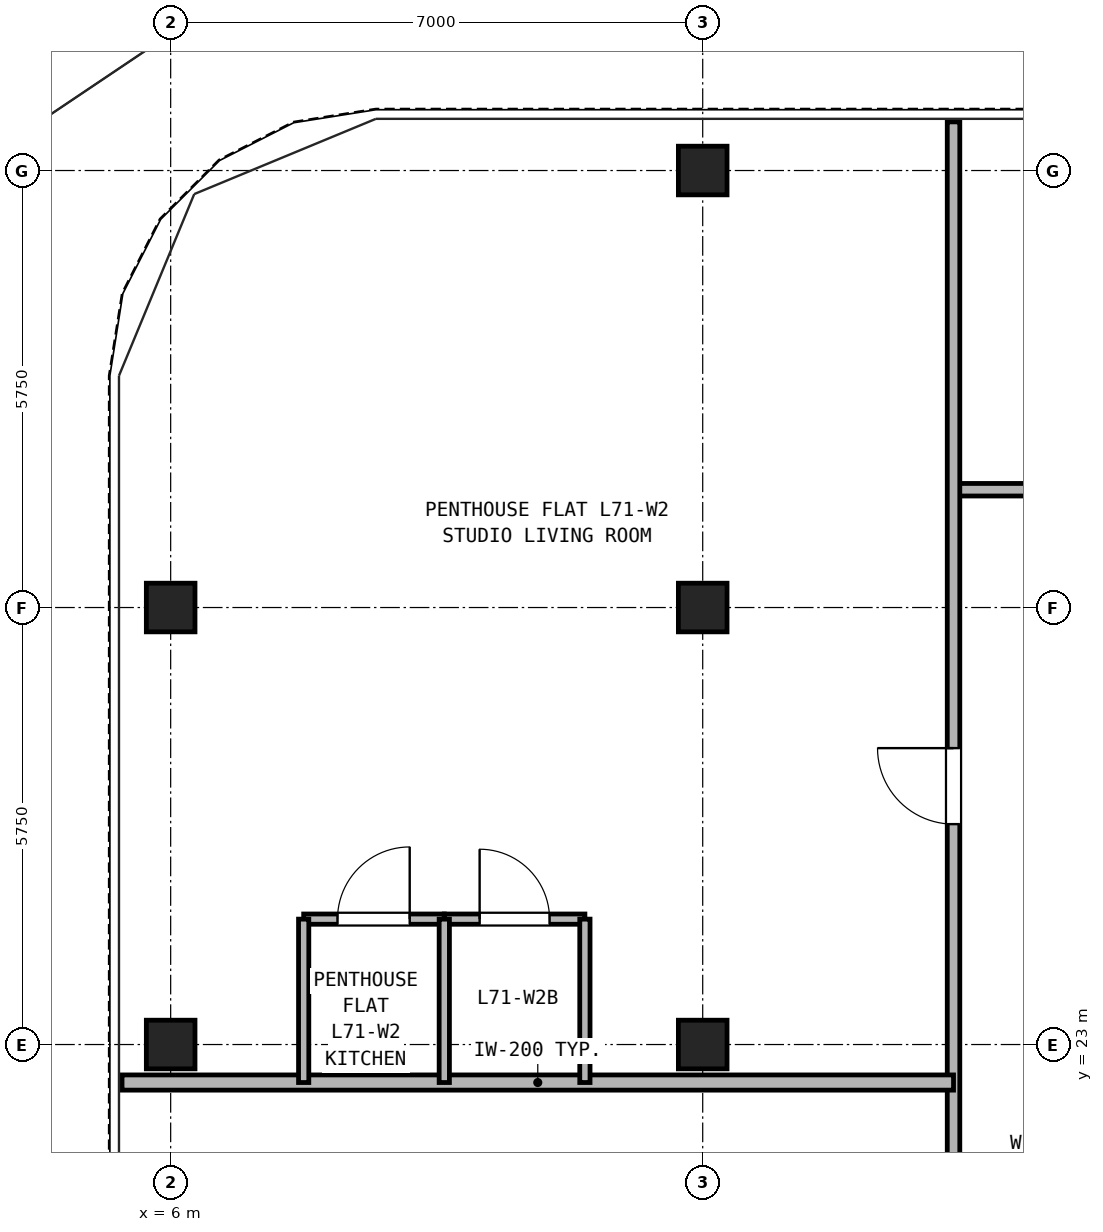
"""IFC4 building model, lengths in metres.
Left out: names, types, materials, properties, quantities, classifications, styles, units other than length and angle.
Written with IfcOpenShell. Run it as: python <this file> out.ifc"""

import sys

from ifc_helpers import new_model, si_unit, direction, frame, frame_2d, origin, origin_2d, place, context, subcontext, project, spatial, rectangle, hollow_rectangle, extrude, source, transform, mapped, element, fill, save


model = new_model("IFC4")
c1 = context("Model", 3, precision=1e-05, world=origin(), true_north=direction((0.0, 1.0)))
c2 = subcontext(c1, "Body", "Model", "MODEL_VIEW")
j1 = project(units=[si_unit("LENGTHUNIT", "METRE"), si_unit("PLANEANGLEUNIT", "RADIAN")], contexts=[c1])
p1 = place(None, origin())
s1 = spatial("IfcSite", under=j1, at=p1, CompositionType="ELEMENT")
p2 = place(p1, origin())
s2 = spatial("IfcBuilding", under=s1, at=p2, CompositionType="ELEMENT")
p3 = place(p2, frame((0.0, 0.0, 248.9)))
s3 = spatial("IfcBuildingStorey", under=s2, at=p3, CompositionType="ELEMENT", Elevation=248.9)
m1 = source(origin(), c2, "Body", "SweptSolid", [
    extrude(hollow_rectangle(XDim=0.64, YDim=0.64, WallThickness=0.035, at=origin_2d()), origin(), (0.0, 0.0, 1.0), 2.98),
])
for number, where, z_axis, x_axis in (
    (1, (13.0, 34.5, 0.0), (0.0, 0.0, 1.0), (1.0, 0.0, 0.0)),
    (2, (6.0, 23.0, 0.0), (0.0, 0.0, 1.0), (1.0, 0.0, 0.0)),
    (3, (6.0, 28.75, 0.0), (0.0, 0.0, 1.0), (1.0, 0.0, 0.0)),
    (4, (13.0, 23.0, 0.0), (0.0, 0.0, 1.0), (1.0, 0.0, 0.0)),
    (5, (13.0, 28.75, 0.0), (0.0, 0.0, 1.0), (1.0, 0.0, 0.0)),
):
    element("IfcColumn", number, at=place(p3, frame(where, z_axis=z_axis, x_axis=x_axis)), inside=s3, PredefinedType="COLUMN", context=c2, shape_type="MappedRepresentation", body=[
        mapped(m1, transform((0.0, 0.0, 0.0), x_axis=(1.0, 0.0, 0.0), y_axis=(0.0, 1.0, 0.0), z_axis=(0.0, 0.0, 1.0), scale=1.0)),
    ])
p4 = place(p3, frame((16.3, 30.3, 0.0), z_axis=(0.0, 0.0, 1.0), x_axis=(1.0, 0.0, 0.0)))
e6 = element("IfcWall", 6, at=p4, inside=s3, PredefinedType="PARTITIONING", context=c2, shape_type="SweptSolid", body=[
    extrude(rectangle(XDim=14.4, YDim=0.165, at=frame_2d((7.2, 0.0))), origin(), (0.0, 0.0, 1.0), 2.98),
])
p5 = place(p4, frame((3.1, 0.0, 0.0)))
e7 = element("IfcOpeningElement", 7, at=p5, cuts=e6, PredefinedType="OPENING", context=c2, shape_type="SweptSolid", body=[
    extrude(rectangle(XDim=0.95, YDim=2.15, at=frame_2d((0.475, 1.075))), frame((0.0, 0.093, 0.0), z_axis=(0.0, -1.0, 0.0), x_axis=(1.0, 0.0, 0.0)), (0.0, 0.0, 1.0), 0.185),
])
p6 = place(p4, frame((8.0, 0.0, 0.0)))
e8 = element("IfcOpeningElement", 8, at=p6, cuts=e6, PredefinedType="OPENING", context=c2, shape_type="SweptSolid", body=[
    extrude(rectangle(XDim=0.95, YDim=2.15, at=frame_2d((0.475, 1.075))), frame((0.0, 0.093, 0.0), z_axis=(0.0, -1.0, 0.0), x_axis=(1.0, 0.0, 0.0)), (0.0, 0.0, 1.0), 0.185),
])
p7 = place(p4, frame((10.8, 0.0, 0.0)))
e9 = element("IfcOpeningElement", 9, at=p7, cuts=e6, PredefinedType="OPENING", context=c2, shape_type="SweptSolid", body=[
    extrude(rectangle(XDim=0.92, YDim=2.1, at=frame_2d((0.46, 1.05))), frame((0.0, 0.093, 0.0), z_axis=(0.0, -1.0, 0.0), x_axis=(1.0, 0.0, 0.0)), (0.0, 0.0, 1.0), 0.185),
])
p8 = place(p3, frame((16.3, 11.2, 0.0), z_axis=(0.0, 0.0, 1.0), x_axis=(0.0, 1.0, 0.0)))
e10 = element("IfcWall", 10, at=p8, inside=s3, PredefinedType="PARTITIONING", context=c2, shape_type="SweptSolid", body=[
    extrude(rectangle(XDim=23.94, YDim=0.165, at=frame_2d((11.97, 0.0))), origin(), (0.0, 0.0, 1.0), 2.98),
])
p9 = place(p8, frame((5.15, 0.0, 0.0)))
e11 = element("IfcOpeningElement", 11, at=p9, cuts=e10, PredefinedType="OPENING", context=c2, shape_type="SweptSolid", body=[
    extrude(rectangle(XDim=1.0, YDim=2.15, at=frame_2d((0.5, 1.075))), frame((0.0, 0.093, 0.0), z_axis=(0.0, -1.0, 0.0), x_axis=(1.0, 0.0, 0.0)), (0.0, 0.0, 1.0), 0.185),
])
p10 = place(p8, frame((14.7, 0.0, 0.0)))
e12 = element("IfcOpeningElement", 12, at=p10, cuts=e10, PredefinedType="OPENING", context=c2, shape_type="SweptSolid", body=[
    extrude(rectangle(XDim=1.0, YDim=2.15, at=frame_2d((0.5, 1.075))), frame((0.0, 0.093, 0.0), z_axis=(0.0, -1.0, 0.0), x_axis=(1.0, 0.0, 0.0)), (0.0, 0.0, 1.0), 0.185),
])
p11 = place(p3, frame((5.36, 22.5, 0.0), z_axis=(0.0, 0.0, 1.0), x_axis=(1.0, 0.0, 0.0)))
e13 = element("IfcWall", 13, at=p11, inside=s3, PredefinedType="PARTITIONING", context=c2, shape_type="SweptSolid", body=[
    extrude(rectangle(XDim=10.94, YDim=0.2, at=frame_2d((5.47, 0.0))), origin(), (0.0, 0.0, 1.0), 2.98),
])
p12 = place(p3, frame((7.75, 24.65, 0.0), z_axis=(0.0, 0.0, 1.0), x_axis=(1.0, 0.0, 0.0)))
e14 = element("IfcWall", 14, at=p12, inside=s3, PredefinedType="PARTITIONING", context=c2, shape_type="SweptSolid", body=[
    extrude(rectangle(XDim=1.85, YDim=0.135, at=frame_2d((0.925, 0.0))), origin(), (0.0, 0.0, 1.0), 2.98),
])
p13 = place(p12, frame((0.445, 0.0, 0.0)))
e15 = element("IfcOpeningElement", 15, at=p13, cuts=e14, PredefinedType="OPENING", context=c2, shape_type="SweptSolid", body=[
    extrude(rectangle(XDim=0.95, YDim=2.15, at=frame_2d((0.475, 1.075))), frame((0.0, 0.077, 0.0), z_axis=(0.0, -1.0, 0.0), x_axis=(1.0, 0.0, 0.0)), (0.0, 0.0, 1.0), 0.155),
])
p14 = place(p3, frame((9.6, 24.65, 0.0), z_axis=(0.0, 0.0, 1.0), x_axis=(1.0, 0.0, 0.0)))
e16 = element("IfcWall", 16, at=p14, inside=s3, PredefinedType="PARTITIONING", context=c2, shape_type="SweptSolid", body=[
    extrude(rectangle(XDim=1.85, YDim=0.135, at=frame_2d((0.925, 0.0))), origin(), (0.0, 0.0, 1.0), 2.98),
])
p15 = place(p14, frame((0.465, 0.0, 0.0)))
e17 = element("IfcOpeningElement", 17, at=p15, cuts=e16, PredefinedType="OPENING", context=c2, shape_type="SweptSolid", body=[
    extrude(rectangle(XDim=0.92, YDim=2.1, at=frame_2d((0.46, 1.05))), frame((0.0, 0.077, 0.0), z_axis=(0.0, -1.0, 0.0), x_axis=(1.0, 0.0, 0.0)), (0.0, 0.0, 1.0), 0.155),
])
for number, where, z_axis, x_axis in (
    (18, (7.75, 22.5, 0.0), (0.0, 0.0, 1.0), (0.0, 1.0, 0.0)),
    (19, (9.6, 22.5, 0.0), (0.0, 0.0, 1.0), (0.0, 1.0, 0.0)),
    (20, (11.45, 22.5, 0.0), (0.0, 0.0, 1.0), (0.0, 1.0, 0.0)),
):
    element("IfcWall", number, at=place(p3, frame(where, z_axis=z_axis, x_axis=x_axis)), inside=s3, PredefinedType="PARTITIONING", context=c2, shape_type="SweptSolid", body=[
        extrude(rectangle(XDim=2.15, YDim=0.135, at=frame_2d((1.075, 0.0))), origin(), (0.0, 0.0, 1.0), 2.98),
    ])
p16 = place(p13, origin())
e21 = element("IfcDoor", 21, at=p16, inside=s3, OperationType="SINGLE_SWING_RIGHT", PredefinedType="DOOR", context=c2, shape_type="SweptSolid", body=[
    extrude(rectangle(XDim=0.95, YDim=2.15, at=frame_2d((0.475, 1.075))), frame((0.0, 0.025, 0.0), z_axis=(0.0, -1.0, 0.0), x_axis=(1.0, 0.0, 0.0)), (0.0, 0.0, 1.0), 0.05),
])
fill(e15, e21)
p17 = place(p15, origin())
e22 = element("IfcDoor", 22, at=p17, inside=s3, OperationType="SINGLE_SWING_LEFT", PredefinedType="DOOR", context=c2, shape_type="SweptSolid", body=[
    extrude(rectangle(XDim=0.92, YDim=2.1, at=frame_2d((0.46, 1.05))), frame((0.0, 0.025, 0.0), z_axis=(0.0, -1.0, 0.0), x_axis=(1.0, 0.0, 0.0)), (0.0, 0.0, 1.0), 0.05),
])
fill(e17, e22)
p18 = place(p10, origin())
e23 = element("IfcDoor", 23, at=p18, inside=s3, OperationType="SINGLE_SWING_RIGHT", PredefinedType="DOOR", context=c2, shape_type="SweptSolid", body=[
    extrude(rectangle(XDim=1.0, YDim=2.15, at=frame_2d((0.5, 1.075))), frame((0.0, 0.025, 0.0), z_axis=(0.0, -1.0, 0.0), x_axis=(1.0, 0.0, 0.0)), (0.0, 0.0, 1.0), 0.05),
])
fill(e12, e23)
save(model, sys.argv[1])
